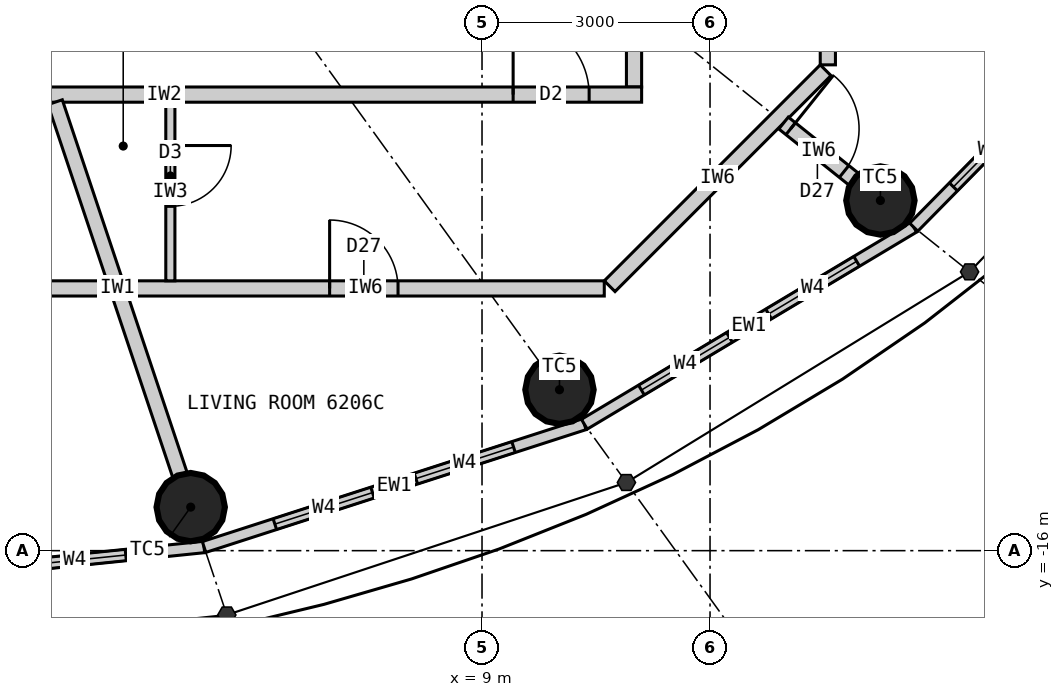
"""IFC4 building model, lengths in metres.
Left out: names, types, materials, properties, quantities, classifications, styles, units other than length and angle.
Written with IfcOpenShell. Run it as: python <this file> out.ifc"""

import sys

from ifc_helpers import new_model, si_unit, direction, frame, frame_2d, origin, origin_2d, place, context, subcontext, project, spatial, rectangle, circle, extrude, clip, halfspace, element, fill, save


model = new_model("IFC4")
c1 = context("Model", 3, precision=1e-05, world=origin(), true_north=direction((0.0, 1.0)))
c2 = subcontext(c1, "Body", "Model", "MODEL_VIEW")
j1 = project(units=[si_unit("LENGTHUNIT", "METRE"), si_unit("PLANEANGLEUNIT", "RADIAN")], contexts=[c1])
p1 = place(None, origin())
s1 = spatial("IfcSite", under=j1, at=p1, CompositionType="ELEMENT")
p2 = place(p1, origin())
s2 = spatial("IfcBuilding", under=s1, at=p2, CompositionType="ELEMENT")
p3 = place(p2, frame((0.0, 0.0, 229.2)))
s3 = spatial("IfcBuildingStorey", under=s2, at=p3, CompositionType="ELEMENT", Elevation=229.2)
for number, where, z_axis, x_axis in (
    (1, (5.167, -15.427, 0.0), (0.0, 0.0, 1.0), (1.0, 0.0, 0.0)),
    (2, (10.019, -13.883, 0.0), (0.0, 0.0, 1.0), (1.0, 0.0, 0.0)),
    (3, (14.241, -11.393, 0.0), (0.0, 0.0, 1.0), (1.0, 0.0, 0.0)),
):
    element("IfcColumn", number, at=place(p3, frame(where, z_axis=z_axis, x_axis=x_axis)), inside=s3, PredefinedType="COLUMN", context=c2, shape_type="Clipping", body=[
        clip(extrude(circle(Radius=0.45, at=origin_2d()), origin(), (0.0, 0.0, 1.0), 3.3), halfspace(frame((0.0, 0.0, 2.25), z_axis=(0.0, 0.0, 1.0), x_axis=(1.0, 0.0, 0.0)), False)),
    ])
p4 = place(p3, frame((0.0, -16.5, 0.0), z_axis=(0.0, 0.0, 1.0), x_axis=(0.994774574972, 0.102095763818, 0.0)))
e4 = element("IfcWall", 4, at=p4, inside=s3, PredefinedType="ELEMENTEDWALL", context=c2, shape_type="SweptSolid", body=[
    extrude(rectangle(XDim=5.371, YDim=0.15, at=frame_2d((2.686, 0.0))), origin(), (0.0, 0.0, 1.0), 3.05),
])
p5 = place(p4, frame((1.035, 0.0, 0.9)))
e5 = element("IfcOpeningElement", 5, at=p5, cuts=e4, PredefinedType="OPENING", context=c2, shape_type="SweptSolid", body=[
    extrude(rectangle(XDim=1.35, YDim=1.9, at=frame_2d((0.675, 0.95))), frame((0.0, 0.085, 0.0), z_axis=(0.0, -1.0, 0.0), x_axis=(1.0, 0.0, 0.0)), (0.0, 0.0, 1.0), 0.17),
])
p6 = place(p4, frame((2.985, 0.0, 0.9)))
e6 = element("IfcOpeningElement", 6, at=p6, cuts=e4, PredefinedType="OPENING", context=c2, shape_type="SweptSolid", body=[
    extrude(rectangle(XDim=1.35, YDim=1.9, at=frame_2d((0.675, 0.95))), frame((0.0, 0.085, 0.0), z_axis=(0.0, -1.0, 0.0), x_axis=(1.0, 0.0, 0.0)), (0.0, 0.0, 1.0), 0.17),
])
p7 = place(p3, frame((5.343, -15.952, 0.0), z_axis=(0.0, 0.0, 1.0), x_axis=(0.951644702515, 0.307200846638, 0.0)))
e7 = element("IfcWall", 7, at=p7, inside=s3, PredefinedType="ELEMENTEDWALL", context=c2, shape_type="SweptSolid", body=[
    extrude(rectangle(XDim=5.258, YDim=0.15, at=frame_2d((2.629, 0.0))), origin(), (0.0, 0.0, 1.0), 3.05),
])
p8 = place(p7, frame((0.979, 0.0, 0.9)))
e8 = element("IfcOpeningElement", 8, at=p8, cuts=e7, PredefinedType="OPENING", context=c2, shape_type="SweptSolid", body=[
    extrude(rectangle(XDim=1.35, YDim=1.9, at=frame_2d((0.675, 0.95))), frame((0.0, 0.085, 0.0), z_axis=(0.0, -1.0, 0.0), x_axis=(1.0, 0.0, 0.0)), (0.0, 0.0, 1.0), 0.17),
])
p9 = place(p7, frame((2.929, 0.0, 0.9)))
e9 = element("IfcOpeningElement", 9, at=p9, cuts=e7, PredefinedType="OPENING", context=c2, shape_type="SweptSolid", body=[
    extrude(rectangle(XDim=1.35, YDim=1.9, at=frame_2d((0.675, 0.95))), frame((0.0, 0.085, 0.0), z_axis=(0.0, -1.0, 0.0), x_axis=(1.0, 0.0, 0.0)), (0.0, 0.0, 1.0), 0.17),
])
p10 = place(p3, frame((10.346, -14.336, 0.0), z_axis=(0.0, 0.0, 1.0), x_axis=(0.85822150553, 0.513279502265, 0.0)))
e10 = element("IfcWall", 10, at=p10, inside=s3, PredefinedType="ELEMENTEDWALL", context=c2, shape_type="SweptSolid", body=[
    extrude(rectangle(XDim=5.05, YDim=0.15, at=frame_2d((2.525, 0.0))), origin(), (0.0, 0.0, 1.0), 3.05),
])
p11 = place(p10, frame((0.875, 0.0, 0.9)))
e11 = element("IfcOpeningElement", 11, at=p11, cuts=e10, PredefinedType="OPENING", context=c2, shape_type="SweptSolid", body=[
    extrude(rectangle(XDim=1.35, YDim=1.9, at=frame_2d((0.675, 0.95))), frame((0.0, 0.085, 0.0), z_axis=(0.0, -1.0, 0.0), x_axis=(1.0, 0.0, 0.0)), (0.0, 0.0, 1.0), 0.17),
])
p12 = place(p10, frame((2.825, 0.0, 0.9)))
e12 = element("IfcOpeningElement", 12, at=p12, cuts=e10, PredefinedType="OPENING", context=c2, shape_type="SweptSolid", body=[
    extrude(rectangle(XDim=1.35, YDim=1.9, at=frame_2d((0.675, 0.95))), frame((0.0, 0.085, 0.0), z_axis=(0.0, -1.0, 0.0), x_axis=(1.0, 0.0, 0.0)), (0.0, 0.0, 1.0), 0.17),
])
p13 = place(p3, frame((14.68, -11.744, 0.0), z_axis=(0.0, 0.0, 1.0), x_axis=(0.701527379618, 0.712642501993, 0.0)))
e13 = element("IfcWall", 13, at=p13, inside=s3, PredefinedType="ELEMENTEDWALL", context=c2, shape_type="SweptSolid", body=[
    extrude(rectangle(XDim=4.788, YDim=0.15, at=frame_2d((2.394, 0.0))), origin(), (0.0, 0.0, 1.0), 3.05),
])
p14 = place(p13, frame((0.744, 0.0, 0.9)))
e14 = element("IfcOpeningElement", 14, at=p14, cuts=e13, PredefinedType="OPENING", context=c2, shape_type="SweptSolid", body=[
    extrude(rectangle(XDim=1.35, YDim=1.9, at=frame_2d((0.675, 0.95))), frame((0.0, 0.085, 0.0), z_axis=(0.0, -1.0, 0.0), x_axis=(1.0, 0.0, 0.0)), (0.0, 0.0, 1.0), 0.17),
])
p15 = place(p13, frame((2.694, 0.0, 0.9)))
e15 = element("IfcOpeningElement", 15, at=p15, cuts=e13, PredefinedType="OPENING", context=c2, shape_type="SweptSolid", body=[
    extrude(rectangle(XDim=1.35, YDim=1.9, at=frame_2d((0.675, 0.95))), frame((0.0, 0.085, 0.0), z_axis=(0.0, -1.0, 0.0), x_axis=(1.0, 0.0, 0.0)), (0.0, 0.0, 1.0), 0.17),
])
p16 = place(p3, frame((11.0, -9.9, 0.0), z_axis=(0.0, 0.0, 1.0), x_axis=(0.0, 1.0, 0.0)))
e16 = element("IfcWall", 16, at=p16, inside=s3, PredefinedType="PARTITIONING", context=c2, shape_type="SweptSolid", body=[
    extrude(rectangle(XDim=19.8, YDim=0.2, at=frame_2d((9.9, 0.0))), origin(), (0.0, 0.0, 1.0), 3.05),
])
p17 = place(p16, frame((16.096, 0.0, 0.0)))
e17 = element("IfcOpeningElement", 17, at=p17, cuts=e16, PredefinedType="OPENING", context=c2, shape_type="SweptSolid", body=[
    extrude(rectangle(XDim=1.0, YDim=2.2, at=frame_2d((0.5, 1.1))), frame((0.0, 0.11, 0.0), z_axis=(0.0, -1.0, 0.0), x_axis=(1.0, 0.0, 0.0)), (0.0, 0.0, 1.0), 0.22),
])
p18 = place(p3, frame((11.1, -10.0, 0.0), z_axis=(0.0, 0.0, 1.0), x_axis=(-1.0, 0.0, 0.0)))
e18 = element("IfcWall", 18, at=p18, inside=s3, PredefinedType="PARTITIONING", context=c2, shape_type="SweptSolid", body=[
    extrude(rectangle(XDim=12.559, YDim=0.2, at=frame_2d((6.28, 0.0))), origin(), (0.0, 0.0, 1.0), 3.05),
])
p19 = place(p18, frame((0.691, 0.0, 0.0)))
e19 = element("IfcOpeningElement", 19, at=p19, cuts=e18, PredefinedType="OPENING", context=c2, shape_type="SweptSolid", body=[
    extrude(rectangle(XDim=1.0, YDim=2.2, at=frame_2d((0.5, 1.1))), frame((0.0, 0.11, 0.0), z_axis=(0.0, -1.0, 0.0), x_axis=(1.0, 0.0, 0.0)), (0.0, 0.0, 1.0), 0.22),
])
p20 = place(p3, frame((3.383, -10.1, 0.0), z_axis=(0.0, 0.0, 1.0), x_axis=(0.317602151035, -0.948224063003, 0.0)))
e20 = element("IfcWall", 20, at=p20, inside=s3, PredefinedType="PARTITIONING", context=c2, shape_type="SweptSolid", body=[
    extrude(rectangle(XDim=5.168, YDim=0.2, at=frame_2d((2.584, 0.0))), origin(), (0.0, 0.0, 1.0), 2.15),
])
p21 = place(p3, frame((-6.364, -12.55, 0.0), z_axis=(0.0, 0.0, 1.0), x_axis=(1.0, 0.0, 0.0)))
e21 = element("IfcWall", 21, at=p21, inside=s3, PredefinedType="PARTITIONING", context=c2, shape_type="SweptSolid", body=[
    extrude(rectangle(XDim=10.446, YDim=0.2, at=frame_2d((5.223, 0.0))), origin(), (0.0, 0.0, 1.0), 3.05),
])
p22 = place(p21, frame((7.202, 0.0, 0.0)))
e22 = element("IfcOpeningElement", 22, at=p22, cuts=e21, PredefinedType="OPENING", context=c2, shape_type="SweptSolid", body=[
    extrude(rectangle(XDim=0.8, YDim=2.1, at=frame_2d((0.4, 1.05))), frame((0.0, 0.11, 0.0), z_axis=(0.0, -1.0, 0.0), x_axis=(1.0, 0.0, 0.0)), (0.0, 0.0, 1.0), 0.22),
])
p23 = place(p21, frame((3.895, 0.0, 0.0)))
e23 = element("IfcOpeningElement", 23, at=p23, cuts=e21, PredefinedType="OPENING", context=c2, shape_type="SweptSolid", body=[
    extrude(rectangle(XDim=0.9, YDim=2.1, at=frame_2d((0.45, 1.05))), frame((0.0, 0.11, 0.0), z_axis=(0.0, -1.0, 0.0), x_axis=(1.0, 0.0, 0.0)), (0.0, 0.0, 1.0), 0.22),
])
p24 = place(p3, frame((4.325, -12.55, 0.0), z_axis=(0.0, 0.0, 1.0), x_axis=(1.0, 0.0, 0.0)))
e24 = element("IfcWall", 24, at=p24, inside=s3, PredefinedType="PARTITIONING", context=c2, shape_type="SweptSolid", body=[
    extrude(rectangle(XDim=6.284, YDim=0.2, at=frame_2d((3.142, 0.0))), origin(), (0.0, 0.0, 1.0), 3.05),
])
p25 = place(p24, frame((2.67, 0.0, 0.0)))
e25 = element("IfcOpeningElement", 25, at=p25, cuts=e24, PredefinedType="OPENING", context=c2, shape_type="SweptSolid", body=[
    extrude(rectangle(XDim=0.9, YDim=2.1, at=frame_2d((0.45, 1.05))), frame((0.0, 0.11, 0.0), z_axis=(0.0, -1.0, 0.0), x_axis=(1.0, 0.0, 0.0)), (0.0, 0.0, 1.0), 0.22),
])
p26 = place(p3, frame((10.679, -12.521, 0.0), z_axis=(0.0, 0.0, 1.0), x_axis=(0.707106781187, 0.707106781187, 0.0)))
e26 = element("IfcWall", 26, at=p26, inside=s3, PredefinedType="PARTITIONING", context=c2, shape_type="SweptSolid", body=[
    extrude(rectangle(XDim=4.019, YDim=0.2, at=frame_2d((2.009, 0.0))), origin(), (0.0, 0.0, 1.0), 3.05),
])
p27 = place(p3, frame((13.55, -9.609, 0.0), z_axis=(0.0, 0.0, 1.0), x_axis=(0.0, 1.0, 0.0)))
e27 = element("IfcWall", 27, at=p27, inside=s3, PredefinedType="PARTITIONING", context=c2, shape_type="SweptSolid", body=[
    extrude(rectangle(XDim=9.508, YDim=0.2, at=frame_2d((4.754, 0.0))), origin(), (0.0, 0.0, 1.0), 3.05),
])
p28 = place(p27, frame((3.77, 0.0, 0.0)))
e28 = element("IfcOpeningElement", 28, at=p28, cuts=e27, PredefinedType="OPENING", context=c2, shape_type="SweptSolid", body=[
    extrude(rectangle(XDim=0.9, YDim=2.1, at=frame_2d((0.45, 1.05))), frame((0.0, 0.11, 0.0), z_axis=(0.0, -1.0, 0.0), x_axis=(1.0, 0.0, 0.0)), (0.0, 0.0, 1.0), 0.22),
])
p29 = place(p27, frame((5.588, 0.0, 0.0)))
e29 = element("IfcOpeningElement", 29, at=p29, cuts=e27, PredefinedType="OPENING", context=c2, shape_type="SweptSolid", body=[
    extrude(rectangle(XDim=0.9, YDim=2.1, at=frame_2d((0.45, 1.05))), frame((0.0, 0.11, 0.0), z_axis=(0.0, -1.0, 0.0), x_axis=(1.0, 0.0, 0.0)), (0.0, 0.0, 1.0), 0.22),
])
p30 = place(p27, frame((7.308, 0.0, 0.0)))
e30 = element("IfcOpeningElement", 30, at=p30, cuts=e27, PredefinedType="OPENING", context=c2, shape_type="SweptSolid", body=[
    extrude(rectangle(XDim=0.8, YDim=2.1, at=frame_2d((0.4, 1.05))), frame((0.0, 0.11, 0.0), z_axis=(0.0, -1.0, 0.0), x_axis=(1.0, 0.0, 0.0)), (0.0, 0.0, 1.0), 0.22),
])
p31 = place(p3, frame((12.968, -10.374, 0.0), z_axis=(0.0, 0.0, 1.0), x_axis=(0.780888968944, -0.624669847345, 0.0)))
e31 = element("IfcWall", 31, at=p31, inside=s3, PredefinedType="PARTITIONING", context=c2, shape_type="SweptSolid", body=[
    extrude(rectangle(XDim=1.181, YDim=0.2, at=frame_2d((0.591, 0.0))), origin(), (0.0, 0.0, 1.0), 2.15),
])
p32 = place(p31, frame((0.12, 0.0, 0.0)))
e32 = element("IfcOpeningElement", 32, at=p32, cuts=e31, PredefinedType="OPENING", context=c2, shape_type="SweptSolid", body=[
    extrude(rectangle(XDim=0.9, YDim=2.1, at=frame_2d((0.45, 1.05))), frame((0.0, 0.11, 0.0), z_axis=(0.0, -1.0, 0.0), x_axis=(1.0, 0.0, 0.0)), (0.0, 0.0, 1.0), 0.22),
])
p33 = place(p3, frame((4.899, -10.1, 0.0), z_axis=(0.0, 0.0, 1.0), x_axis=(0.0, -1.0, 0.0)))
e33 = element("IfcWall", 33, at=p33, inside=s3, PredefinedType="PARTITIONING", context=c2, shape_type="SweptSolid", body=[
    extrude(rectangle(XDim=2.35, YDim=0.12, at=frame_2d((1.175, 0.0))), origin(), (0.0, 0.0, 1.0), 3.05),
])
p34 = place(p33, frame((0.57, 0.0, 0.0)))
e34 = element("IfcOpeningElement", 34, at=p34, cuts=e33, PredefinedType="OPENING", context=c2, shape_type="SweptSolid", body=[
    extrude(rectangle(XDim=0.8, YDim=2.1, at=frame_2d((0.4, 1.05))), frame((0.0, 0.07, 0.0), z_axis=(0.0, -1.0, 0.0), x_axis=(1.0, 0.0, 0.0)), (0.0, 0.0, 1.0), 0.14),
])
p35 = place(p6, origin())
e35 = element("IfcWindow", 35, at=p35, inside=s3, PartitioningType="SINGLE_PANEL", PredefinedType="WINDOW", context=c2, shape_type="SweptSolid", body=[
    extrude(rectangle(XDim=1.35, YDim=1.9, at=frame_2d((0.675, 0.95))), frame((0.0, 0.03, 0.0), z_axis=(0.0, -1.0, 0.0), x_axis=(1.0, 0.0, 0.0)), (0.0, 0.0, 1.0), 0.06),
])
fill(e6, e35)
p36 = place(p8, origin())
e36 = element("IfcWindow", 36, at=p36, inside=s3, PartitioningType="SINGLE_PANEL", PredefinedType="WINDOW", context=c2, shape_type="SweptSolid", body=[
    extrude(rectangle(XDim=1.35, YDim=1.9, at=frame_2d((0.675, 0.95))), frame((0.0, 0.03, 0.0), z_axis=(0.0, -1.0, 0.0), x_axis=(1.0, 0.0, 0.0)), (0.0, 0.0, 1.0), 0.06),
])
fill(e8, e36)
p37 = place(p9, origin())
e37 = element("IfcWindow", 37, at=p37, inside=s3, PartitioningType="SINGLE_PANEL", PredefinedType="WINDOW", context=c2, shape_type="SweptSolid", body=[
    extrude(rectangle(XDim=1.35, YDim=1.9, at=frame_2d((0.675, 0.95))), frame((0.0, 0.03, 0.0), z_axis=(0.0, -1.0, 0.0), x_axis=(1.0, 0.0, 0.0)), (0.0, 0.0, 1.0), 0.06),
])
fill(e9, e37)
p38 = place(p11, origin())
e38 = element("IfcWindow", 38, at=p38, inside=s3, PartitioningType="SINGLE_PANEL", PredefinedType="WINDOW", context=c2, shape_type="SweptSolid", body=[
    extrude(rectangle(XDim=1.35, YDim=1.9, at=frame_2d((0.675, 0.95))), frame((0.0, 0.03, 0.0), z_axis=(0.0, -1.0, 0.0), x_axis=(1.0, 0.0, 0.0)), (0.0, 0.0, 1.0), 0.06),
])
fill(e11, e38)
p39 = place(p12, origin())
e39 = element("IfcWindow", 39, at=p39, inside=s3, PartitioningType="SINGLE_PANEL", PredefinedType="WINDOW", context=c2, shape_type="SweptSolid", body=[
    extrude(rectangle(XDim=1.35, YDim=1.9, at=frame_2d((0.675, 0.95))), frame((0.0, 0.03, 0.0), z_axis=(0.0, -1.0, 0.0), x_axis=(1.0, 0.0, 0.0)), (0.0, 0.0, 1.0), 0.06),
])
fill(e12, e39)
p40 = place(p14, origin())
e40 = element("IfcWindow", 40, at=p40, inside=s3, PartitioningType="SINGLE_PANEL", PredefinedType="WINDOW", context=c2, shape_type="SweptSolid", body=[
    extrude(rectangle(XDim=1.35, YDim=1.9, at=frame_2d((0.675, 0.95))), frame((0.0, 0.03, 0.0), z_axis=(0.0, -1.0, 0.0), x_axis=(1.0, 0.0, 0.0)), (0.0, 0.0, 1.0), 0.06),
])
fill(e14, e40)
p41 = place(p19, origin())
e41 = element("IfcDoor", 41, at=p41, inside=s3, OperationType="SINGLE_SWING_RIGHT", PredefinedType="DOOR", context=c2, shape_type="SweptSolid", body=[
    extrude(rectangle(XDim=1.0, YDim=2.2, at=frame_2d((0.5, 1.1))), frame((0.0, 0.025, 0.0), z_axis=(0.0, -1.0, 0.0), x_axis=(1.0, 0.0, 0.0)), (0.0, 0.0, 1.0), 0.05),
])
fill(e19, e41)
p42 = place(p34, origin())
e42 = element("IfcDoor", 42, at=p42, inside=s3, OperationType="SINGLE_SWING_LEFT", PredefinedType="DOOR", context=c2, shape_type="SweptSolid", body=[
    extrude(rectangle(XDim=0.8, YDim=2.1, at=frame_2d((0.4, 1.05))), frame((0.0, 0.025, 0.0), z_axis=(0.0, -1.0, 0.0), x_axis=(1.0, 0.0, 0.0)), (0.0, 0.0, 1.0), 0.05),
])
fill(e34, e42)
p43 = place(p25, origin())
e43 = element("IfcDoor", 43, at=p43, inside=s3, OperationType="SINGLE_SWING_LEFT", PredefinedType="DOOR", context=c2, shape_type="SweptSolid", body=[
    extrude(rectangle(XDim=0.9, YDim=2.1, at=frame_2d((0.45, 1.05))), frame((0.0, 0.025, 0.0), z_axis=(0.0, -1.0, 0.0), x_axis=(1.0, 0.0, 0.0)), (0.0, 0.0, 1.0), 0.05),
])
fill(e25, e43)
p44 = place(p32, origin())
e44 = element("IfcDoor", 44, at=p44, inside=s3, OperationType="SINGLE_SWING_LEFT", PredefinedType="DOOR", context=c2, shape_type="SweptSolid", body=[
    extrude(rectangle(XDim=0.9, YDim=2.1, at=frame_2d((0.45, 1.05))), frame((0.0, 0.025, 0.0), z_axis=(0.0, -1.0, 0.0), x_axis=(1.0, 0.0, 0.0)), (0.0, 0.0, 1.0), 0.05),
])
fill(e32, e44)
save(model, sys.argv[1])
